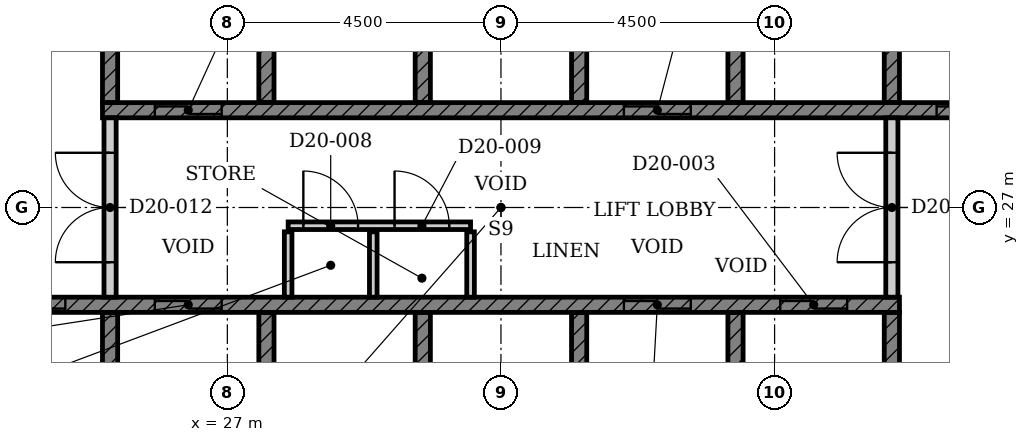
"""IFC4 building model, lengths in metres.
Left out: names, types, materials, properties, quantities, classifications, styles, units other than length and angle.
Written with IfcOpenShell. Run it as: python <this file> out.ifc"""

import sys

from ifc_helpers import new_model, si_unit, direction, frame, frame_2d, origin, place, context, subcontext, project, spatial, polyline, rectangle, outline, extrude, element, fill, save


model = new_model("IFC4")
c1 = context("Model", 3, precision=1e-05, world=origin(), true_north=direction((0.0, 1.0)))
c2 = subcontext(c1, "Body", "Model", "MODEL_VIEW")
j1 = project(units=[si_unit("LENGTHUNIT", "METRE"), si_unit("PLANEANGLEUNIT", "RADIAN")], contexts=[c1])
p1 = place(None, origin())
s1 = spatial("IfcSite", under=j1, at=p1, CompositionType="ELEMENT")
p2 = place(p1, origin())
s2 = spatial("IfcBuilding", under=s1, at=p2, CompositionType="ELEMENT")
p3 = place(p2, frame((0.0, 0.0, 85.2)))
s3 = spatial("IfcBuildingStorey", under=s2, at=p3, CompositionType="ELEMENT", Elevation=85.2)
p4 = place(p3, origin())
e1 = element("IfcWall", 1, at=p4, inside=s3, PredefinedType="SHEAR", context=c2, shape_type="SweptSolid", body=[
    extrude(outline(polyline([(22.375, 22.35), (38.053, 22.35), (38.053, 25.275), (37.803, 25.275), (37.803, 22.65), (35.482, 22.65), (35.482, 25.275), (35.232, 25.275), (35.232, 22.65), (32.911, 22.65), (32.911, 25.275), (32.661, 25.275), (32.661, 22.65), (30.339, 22.65), (30.339, 25.275), (30.089, 25.275), (30.089, 22.65), (27.768, 22.65), (27.768, 25.275), (27.518, 25.275), (27.518, 22.65), (25.197, 22.65), (25.197, 25.275), (24.947, 25.275), (24.947, 22.65), (22.625, 22.65), (22.625, 25.275), (22.375, 25.275), (22.375, 22.35)])), origin(), (0.0, 0.0, 1.0), 3.3),
])
p5 = place(p3, origin())
e2 = element("IfcWall", 2, at=p5, inside=s3, PredefinedType="SHEAR", context=c2, shape_type="SweptSolid", body=[
    extrude(outline(polyline([(24.947, 28.725), (25.197, 28.725), (25.197, 31.35), (27.518, 31.35), (27.518, 28.725), (27.768, 28.725), (27.768, 31.35), (30.089, 31.35), (30.089, 28.725), (30.339, 28.725), (30.339, 31.35), (32.661, 31.35), (32.661, 28.725), (32.911, 28.725), (32.911, 31.35), (35.232, 31.35), (35.232, 28.725), (35.482, 28.725), (35.482, 31.35), (37.803, 31.35), (37.803, 28.725), (38.053, 28.725), (38.053, 31.35), (40.375, 31.35), (40.375, 28.725), (40.625, 28.725), (40.625, 31.65), (24.947, 31.65), (24.947, 28.725)])), origin(), (0.0, 0.0, 1.0), 3.3),
])
p6 = place(p3, frame((22.375, 25.4, 0.0), z_axis=(0.0, 0.0, 1.0), x_axis=(1.0, 0.0, 0.0)))
e3 = element("IfcWall", 3, at=p6, inside=s3, PredefinedType="SHEAR", context=c2, shape_type="SweptSolid", body=[
    extrude(rectangle(XDim=15.678, YDim=0.25, at=frame_2d((7.839, 0.0))), origin(), (0.0, 0.0, 1.0), 3.3),
])
p7 = place(p6, frame((3.432, 0.0, 0.0)))
e4 = element("IfcOpeningElement", 4, at=p7, cuts=e3, PredefinedType="OPENING", context=c2, shape_type="SweptSolid", body=[
    extrude(rectangle(XDim=1.1, YDim=2.1, at=frame_2d((0.55, 1.05))), frame((0.0, 0.135, 0.0), z_axis=(0.0, -1.0, 0.0), x_axis=(1.0, 0.0, 0.0)), (0.0, 0.0, 1.0), 0.27),
])
p8 = place(p6, frame((11.146, 0.0, 0.0)))
e5 = element("IfcOpeningElement", 5, at=p8, cuts=e3, PredefinedType="OPENING", context=c2, shape_type="SweptSolid", body=[
    extrude(rectangle(XDim=1.1, YDim=2.1, at=frame_2d((0.55, 1.05))), frame((0.0, 0.135, 0.0), z_axis=(0.0, -1.0, 0.0), x_axis=(1.0, 0.0, 0.0)), (0.0, 0.0, 1.0), 0.27),
])
p9 = place(p6, frame((13.718, 0.0, 0.0)))
e6 = element("IfcOpeningElement", 6, at=p9, cuts=e3, PredefinedType="OPENING", context=c2, shape_type="SweptSolid", body=[
    extrude(rectangle(XDim=1.1, YDim=2.1, at=frame_2d((0.55, 1.05))), frame((0.0, 0.135, 0.0), z_axis=(0.0, -1.0, 0.0), x_axis=(1.0, 0.0, 0.0)), (0.0, 0.0, 1.0), 0.27),
])
p10 = place(p6, frame((0.861, 0.0, 0.0)))
e7 = element("IfcOpeningElement", 7, at=p10, cuts=e3, PredefinedType="OPENING", context=c2, shape_type="SweptSolid", body=[
    extrude(rectangle(XDim=1.1, YDim=2.1, at=frame_2d((0.55, 1.05))), frame((0.0, 0.135, 0.0), z_axis=(0.0, -1.0, 0.0), x_axis=(1.0, 0.0, 0.0)), (0.0, 0.0, 1.0), 0.27),
])
p11 = place(p3, frame((24.947, 28.6, 0.0), z_axis=(0.0, 0.0, 1.0), x_axis=(1.0, 0.0, 0.0)))
e8 = element("IfcWall", 8, at=p11, inside=s3, PredefinedType="SHEAR", context=c2, shape_type="SweptSolid", body=[
    extrude(rectangle(XDim=15.678, YDim=0.25, at=frame_2d((7.839, 0.0))), origin(), (0.0, 0.0, 1.0), 3.3),
])
p12 = place(p11, frame((0.861, 0.0, 0.0)))
e9 = element("IfcOpeningElement", 9, at=p12, cuts=e8, PredefinedType="OPENING", context=c2, shape_type="SweptSolid", body=[
    extrude(rectangle(XDim=1.1, YDim=2.1, at=frame_2d((0.55, 1.05))), frame((0.0, 0.135, 0.0), z_axis=(0.0, -1.0, 0.0), x_axis=(1.0, 0.0, 0.0)), (0.0, 0.0, 1.0), 0.27),
])
p13 = place(p11, frame((8.575, 0.0, 0.0)))
e10 = element("IfcOpeningElement", 10, at=p13, cuts=e8, PredefinedType="OPENING", context=c2, shape_type="SweptSolid", body=[
    extrude(rectangle(XDim=1.1, YDim=2.1, at=frame_2d((0.55, 1.05))), frame((0.0, 0.135, 0.0), z_axis=(0.0, -1.0, 0.0), x_axis=(1.0, 0.0, 0.0)), (0.0, 0.0, 1.0), 0.27),
])
p14 = place(p11, frame((13.718, 0.0, 0.0)))
e11 = element("IfcOpeningElement", 11, at=p14, cuts=e8, PredefinedType="OPENING", context=c2, shape_type="SweptSolid", body=[
    extrude(rectangle(XDim=1.1, YDim=2.1, at=frame_2d((0.55, 1.05))), frame((0.0, 0.135, 0.0), z_axis=(0.0, -1.0, 0.0), x_axis=(1.0, 0.0, 0.0)), (0.0, 0.0, 1.0), 0.27),
])
p15 = place(p3, frame((28.0, 26.7, 0.0), z_axis=(0.0, 0.0, 1.0), x_axis=(1.0, 0.0, 0.0)))
e12 = element("IfcWall", 12, at=p15, inside=s3, PredefinedType="PARTITIONING", context=c2, shape_type="SweptSolid", body=[
    extrude(rectangle(XDim=3.0, YDim=0.125, at=frame_2d((1.5, 0.0))), origin(), (0.0, 0.0, 1.0), 3.3),
])
p16 = place(p15, frame((0.25, 0.0, 0.0)))
e13 = element("IfcOpeningElement", 13, at=p16, cuts=e12, PredefinedType="OPENING", context=c2, shape_type="SweptSolid", body=[
    extrude(rectangle(XDim=0.9, YDim=2.1, at=frame_2d((0.45, 1.05))), frame((0.0, 0.073, 0.0), z_axis=(0.0, -1.0, 0.0), x_axis=(1.0, 0.0, 0.0)), (0.0, 0.0, 1.0), 0.145),
])
p17 = place(p15, frame((1.75, 0.0, 0.0)))
e14 = element("IfcOpeningElement", 14, at=p17, cuts=e12, PredefinedType="OPENING", context=c2, shape_type="SweptSolid", body=[
    extrude(rectangle(XDim=0.9, YDim=2.1, at=frame_2d((0.45, 1.05))), frame((0.0, 0.073, 0.0), z_axis=(0.0, -1.0, 0.0), x_axis=(1.0, 0.0, 0.0)), (0.0, 0.0, 1.0), 0.145),
])
for number, where, z_axis, x_axis in (
    (15, (28.0, 25.525, 0.0), (0.0, 0.0, 1.0), (0.0, 1.0, 0.0)),
    (16, (29.4, 25.525, 0.0), (0.0, 0.0, 1.0), (0.0, 1.0, 0.0)),
    (17, (31.0, 25.525, 0.0), (0.0, 0.0, 1.0), (0.0, 1.0, 0.0)),
):
    element("IfcWall", number, at=place(p3, frame(where, z_axis=z_axis, x_axis=x_axis)), inside=s3, PredefinedType="PARTITIONING", context=c2, shape_type="SweptSolid", body=[
        extrude(rectangle(XDim=1.075, YDim=0.125, at=frame_2d((0.538, 0.0))), origin(), (0.0, 0.0, 1.0), 3.3),
    ])
p18 = place(p3, frame((25.072, 25.525, 0.0), z_axis=(0.0, 0.0, 1.0), x_axis=(0.0, 1.0, 0.0)))
e18 = element("IfcWall", 18, at=p18, inside=s3, PredefinedType="PARTITIONING", context=c2, shape_type="SweptSolid", body=[
    extrude(rectangle(XDim=2.95, YDim=0.2, at=frame_2d((1.475, 0.0))), origin(), (0.0, 0.0, 1.0), 3.3),
])
p19 = place(p18, frame((0.575, 0.0, 0.0)))
e19 = element("IfcOpeningElement", 19, at=p19, cuts=e18, PredefinedType="OPENING", context=c2, shape_type="SweptSolid", body=[
    extrude(rectangle(XDim=1.8, YDim=2.1, at=frame_2d((0.9, 1.05))), frame((0.0, 0.11, 0.0), z_axis=(0.0, -1.0, 0.0), x_axis=(1.0, 0.0, 0.0)), (0.0, 0.0, 1.0), 0.22),
])
p20 = place(p3, frame((37.928, 25.525, 0.0), z_axis=(0.0, 0.0, 1.0), x_axis=(0.0, 1.0, 0.0)))
e20 = element("IfcWall", 20, at=p20, inside=s3, PredefinedType="PARTITIONING", context=c2, shape_type="SweptSolid", body=[
    extrude(rectangle(XDim=2.95, YDim=0.2, at=frame_2d((1.475, 0.0))), origin(), (0.0, 0.0, 1.0), 3.3),
])
p21 = place(p20, frame((0.575, 0.0, 0.0)))
e21 = element("IfcOpeningElement", 21, at=p21, cuts=e20, PredefinedType="OPENING", context=c2, shape_type="SweptSolid", body=[
    extrude(rectangle(XDim=1.8, YDim=2.1, at=frame_2d((0.9, 1.05))), frame((0.0, 0.11, 0.0), z_axis=(0.0, -1.0, 0.0), x_axis=(1.0, 0.0, 0.0)), (0.0, 0.0, 1.0), 0.22),
])
p22 = place(p7, origin())
e22 = element("IfcDoor", 22, at=p22, inside=s3, OperationType="DOUBLE_DOOR_SLIDING", PredefinedType="DOOR", context=c2, shape_type="SweptSolid", body=[
    extrude(rectangle(XDim=1.1, YDim=2.1, at=frame_2d((0.55, 1.05))), frame((0.0, 0.025, 0.0), z_axis=(0.0, -1.0, 0.0), x_axis=(1.0, 0.0, 0.0)), (0.0, 0.0, 1.0), 0.05),
])
fill(e4, e22)
p23 = place(p8, origin())
e23 = element("IfcDoor", 23, at=p23, inside=s3, OperationType="DOUBLE_DOOR_SLIDING", PredefinedType="DOOR", context=c2, shape_type="SweptSolid", body=[
    extrude(rectangle(XDim=1.1, YDim=2.1, at=frame_2d((0.55, 1.05))), frame((0.0, 0.025, 0.0), z_axis=(0.0, -1.0, 0.0), x_axis=(1.0, 0.0, 0.0)), (0.0, 0.0, 1.0), 0.05),
])
fill(e5, e23)
p24 = place(p9, origin())
e24 = element("IfcDoor", 24, at=p24, inside=s3, OperationType="DOUBLE_DOOR_SLIDING", PredefinedType="DOOR", context=c2, shape_type="SweptSolid", body=[
    extrude(rectangle(XDim=1.1, YDim=2.1, at=frame_2d((0.55, 1.05))), frame((0.0, 0.025, 0.0), z_axis=(0.0, -1.0, 0.0), x_axis=(1.0, 0.0, 0.0)), (0.0, 0.0, 1.0), 0.05),
])
fill(e6, e24)
p25 = place(p12, origin())
e25 = element("IfcDoor", 25, at=p25, inside=s3, OperationType="DOUBLE_DOOR_SLIDING", PredefinedType="DOOR", context=c2, shape_type="SweptSolid", body=[
    extrude(rectangle(XDim=1.1, YDim=2.1, at=frame_2d((0.55, 1.05))), frame((0.0, 0.025, 0.0), z_axis=(0.0, -1.0, 0.0), x_axis=(1.0, 0.0, 0.0)), (0.0, 0.0, 1.0), 0.05),
])
fill(e9, e25)
p26 = place(p13, origin())
e26 = element("IfcDoor", 26, at=p26, inside=s3, OperationType="DOUBLE_DOOR_SLIDING", PredefinedType="DOOR", context=c2, shape_type="SweptSolid", body=[
    extrude(rectangle(XDim=1.1, YDim=2.1, at=frame_2d((0.55, 1.05))), frame((0.0, 0.025, 0.0), z_axis=(0.0, -1.0, 0.0), x_axis=(1.0, 0.0, 0.0)), (0.0, 0.0, 1.0), 0.05),
])
fill(e10, e26)
p27 = place(p10, origin())
e27 = element("IfcDoor", 27, at=p27, inside=s3, OperationType="DOUBLE_DOOR_SLIDING", PredefinedType="DOOR", context=c2, shape_type="SweptSolid", body=[
    extrude(rectangle(XDim=1.1, YDim=2.1, at=frame_2d((0.55, 1.05))), frame((0.0, 0.025, 0.0), z_axis=(0.0, -1.0, 0.0), x_axis=(1.0, 0.0, 0.0)), (0.0, 0.0, 1.0), 0.05),
])
fill(e7, e27)
p28 = place(p14, origin())
e28 = element("IfcDoor", 28, at=p28, inside=s3, OperationType="DOUBLE_DOOR_SLIDING", PredefinedType="DOOR", context=c2, shape_type="SweptSolid", body=[
    extrude(rectangle(XDim=1.1, YDim=2.1, at=frame_2d((0.55, 1.05))), frame((0.0, 0.025, 0.0), z_axis=(0.0, -1.0, 0.0), x_axis=(1.0, 0.0, 0.0)), (0.0, 0.0, 1.0), 0.05),
])
fill(e11, e28)
p29 = place(p16, origin())
e29 = element("IfcDoor", 29, at=p29, inside=s3, OperationType="SINGLE_SWING_LEFT", PredefinedType="DOOR", context=c2, shape_type="SweptSolid", body=[
    extrude(rectangle(XDim=0.9, YDim=2.1, at=frame_2d((0.45, 1.05))), frame((0.0, 0.025, 0.0), z_axis=(0.0, -1.0, 0.0), x_axis=(1.0, 0.0, 0.0)), (0.0, 0.0, 1.0), 0.05),
])
fill(e13, e29)
p30 = place(p17, origin())
e30 = element("IfcDoor", 30, at=p30, inside=s3, OperationType="SINGLE_SWING_LEFT", PredefinedType="DOOR", context=c2, shape_type="SweptSolid", body=[
    extrude(rectangle(XDim=0.9, YDim=2.1, at=frame_2d((0.45, 1.05))), frame((0.0, 0.025, 0.0), z_axis=(0.0, -1.0, 0.0), x_axis=(1.0, 0.0, 0.0)), (0.0, 0.0, 1.0), 0.05),
])
fill(e14, e30)
p31 = place(p19, origin())
e31 = element("IfcDoor", 31, at=p31, inside=s3, OperationType="DOUBLE_DOOR_SINGLE_SWING", PredefinedType="DOOR", context=c2, shape_type="SweptSolid", body=[
    extrude(rectangle(XDim=1.8, YDim=2.1, at=frame_2d((0.9, 1.05))), frame((0.0, 0.025, 0.0), z_axis=(0.0, -1.0, 0.0), x_axis=(1.0, 0.0, 0.0)), (0.0, 0.0, 1.0), 0.05),
])
fill(e19, e31)
p32 = place(p21, origin())
e32 = element("IfcDoor", 32, at=p32, inside=s3, OperationType="DOUBLE_DOOR_SINGLE_SWING", PredefinedType="DOOR", context=c2, shape_type="SweptSolid", body=[
    extrude(rectangle(XDim=1.8, YDim=2.1, at=frame_2d((0.9, 1.05))), frame((0.0, 0.025, 0.0), z_axis=(0.0, -1.0, 0.0), x_axis=(1.0, 0.0, 0.0)), (0.0, 0.0, 1.0), 0.05),
])
fill(e21, e32)
save(model, sys.argv[1])
